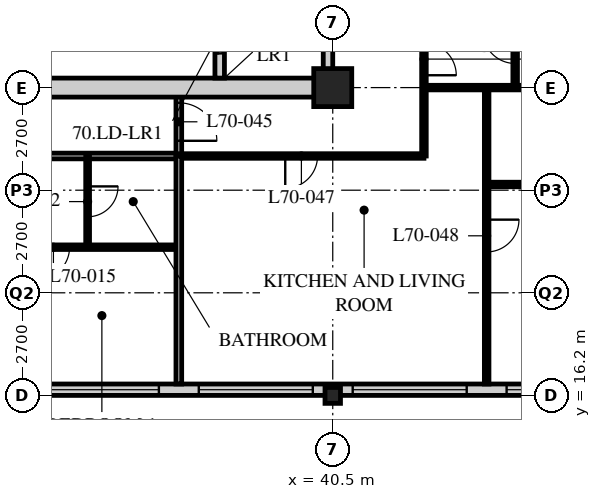
"""IFC4 building model, lengths in metres.
Left out: names, types, materials, properties, quantities, classifications, styles, units other than length and angle.
Written with IfcOpenShell. Run it as: python <this file> out.ifc"""

import sys

from ifc_helpers import new_model, si_unit, direction, frame, frame_2d, origin, origin_2d, place, context, subcontext, project, spatial, rectangle, hollow_rectangle, i_section, extrude, element, fill, save


model = new_model("IFC4")
c1 = context("Model", 3, precision=1e-05, world=origin(), true_north=direction((0.0, 1.0)))
c2 = subcontext(c1, "Body", "Model", "MODEL_VIEW")
j1 = project(units=[si_unit("LENGTHUNIT", "METRE"), si_unit("PLANEANGLEUNIT", "RADIAN")], contexts=[c1])
p1 = place(None, origin())
s1 = spatial("IfcSite", under=j1, at=p1, CompositionType="ELEMENT")
p2 = place(p1, origin())
s2 = spatial("IfcBuilding", under=s1, at=p2, CompositionType="ELEMENT")
p3 = place(p2, frame((0.0, 0.0, 273.6)))
s3 = spatial("IfcBuildingStorey", under=s2, at=p3, CompositionType="ELEMENT", Elevation=273.6)
p4 = place(p3, frame((40.5, 16.2, 0.0), z_axis=(0.0, 0.0, 1.0), x_axis=(1.0, 0.0, 0.0)))
e1 = element("IfcColumn", 1, at=p4, inside=s3, PredefinedType="COLUMN", context=c2, shape_type="SweptSolid", body=[
    extrude(i_section(OverallWidth=0.407, OverallDepth=0.419, WebThickness=0.031, FlangeThickness=0.049, FilletRadius=0.015, at=origin_2d()), origin(), (0.0, 0.0, 1.0), 3.9),
])
p5 = place(p3, frame((40.5, 24.3, 0.0), z_axis=(0.0, 0.0, 1.0), x_axis=(1.0, 0.0, 0.0)))
e2 = element("IfcColumn", 2, at=p5, inside=s3, PredefinedType="COLUMN", context=c2, shape_type="SweptSolid", body=[
    extrude(hollow_rectangle(XDim=1.0, YDim=1.0, WallThickness=0.1, at=origin_2d()), origin(), (0.0, 0.0, 1.0), 3.9),
])
p6 = place(p3, frame((8.4, 16.35, 0.0), z_axis=(0.0, 0.0, 1.0), x_axis=(1.0, 0.0, 0.0)))
e3 = element("IfcWall", 3, at=p6, inside=s3, PredefinedType="SOLIDWALL", context=c2, shape_type="SweptSolid", body=[
    extrude(rectangle(XDim=40.2, YDim=0.3, at=frame_2d((20.1, 0.0))), origin(), (0.0, 0.0, 1.0), 3.69),
])
p7 = place(p6, frame((0.225, 0.0, 0.6)))
e4 = element("IfcOpeningElement", 4, at=p7, cuts=e3, PredefinedType="OPENING", context=c2, shape_type="SweptSolid", body=[
    extrude(rectangle(XDim=3.0, YDim=2.4, at=frame_2d((1.5, 1.2))), frame((0.0, 0.16, 0.0), z_axis=(0.0, -1.0, 0.0), x_axis=(1.0, 0.0, 0.0)), (0.0, 0.0, 1.0), 0.32),
])
p8 = place(p6, frame((4.275, 0.0, 0.6)))
e5 = element("IfcOpeningElement", 5, at=p8, cuts=e3, PredefinedType="OPENING", context=c2, shape_type="SweptSolid", body=[
    extrude(rectangle(XDim=3.0, YDim=2.4, at=frame_2d((1.5, 1.2))), frame((0.0, 0.16, 0.0), z_axis=(0.0, -1.0, 0.0), x_axis=(1.0, 0.0, 0.0)), (0.0, 0.0, 1.0), 0.32),
])
p9 = place(p6, frame((8.325, 0.0, 0.6)))
e6 = element("IfcOpeningElement", 6, at=p9, cuts=e3, PredefinedType="OPENING", context=c2, shape_type="SweptSolid", body=[
    extrude(rectangle(XDim=3.0, YDim=2.4, at=frame_2d((1.5, 1.2))), frame((0.0, 0.16, 0.0), z_axis=(0.0, -1.0, 0.0), x_axis=(1.0, 0.0, 0.0)), (0.0, 0.0, 1.0), 0.32),
])
p10 = place(p6, frame((12.375, 0.0, 0.6)))
e7 = element("IfcOpeningElement", 7, at=p10, cuts=e3, PredefinedType="OPENING", context=c2, shape_type="SweptSolid", body=[
    extrude(rectangle(XDim=3.0, YDim=2.4, at=frame_2d((1.5, 1.2))), frame((0.0, 0.16, 0.0), z_axis=(0.0, -1.0, 0.0), x_axis=(1.0, 0.0, 0.0)), (0.0, 0.0, 1.0), 0.32),
])
p11 = place(p6, frame((16.425, 0.0, 0.6)))
e8 = element("IfcOpeningElement", 8, at=p11, cuts=e3, PredefinedType="OPENING", context=c2, shape_type="SweptSolid", body=[
    extrude(rectangle(XDim=3.0, YDim=2.4, at=frame_2d((1.5, 1.2))), frame((0.0, 0.16, 0.0), z_axis=(0.0, -1.0, 0.0), x_axis=(1.0, 0.0, 0.0)), (0.0, 0.0, 1.0), 0.32),
])
p12 = place(p6, frame((20.475, 0.0, 0.6)))
e9 = element("IfcOpeningElement", 9, at=p12, cuts=e3, PredefinedType="OPENING", context=c2, shape_type="SweptSolid", body=[
    extrude(rectangle(XDim=3.0, YDim=2.4, at=frame_2d((1.5, 1.2))), frame((0.0, 0.16, 0.0), z_axis=(0.0, -1.0, 0.0), x_axis=(1.0, 0.0, 0.0)), (0.0, 0.0, 1.0), 0.32),
])
p13 = place(p6, frame((24.525, 0.0, 0.6)))
e10 = element("IfcOpeningElement", 10, at=p13, cuts=e3, PredefinedType="OPENING", context=c2, shape_type="SweptSolid", body=[
    extrude(rectangle(XDim=3.0, YDim=2.4, at=frame_2d((1.5, 1.2))), frame((0.0, 0.16, 0.0), z_axis=(0.0, -1.0, 0.0), x_axis=(1.0, 0.0, 0.0)), (0.0, 0.0, 1.0), 0.32),
])
p14 = place(p6, frame((28.575, 0.0, 0.6)))
e11 = element("IfcOpeningElement", 11, at=p14, cuts=e3, PredefinedType="OPENING", context=c2, shape_type="SweptSolid", body=[
    extrude(rectangle(XDim=3.0, YDim=2.4, at=frame_2d((1.5, 1.2))), frame((0.0, 0.16, 0.0), z_axis=(0.0, -1.0, 0.0), x_axis=(1.0, 0.0, 0.0)), (0.0, 0.0, 1.0), 0.32),
])
p15 = place(p6, frame((32.625, 0.0, 0.6)))
e12 = element("IfcOpeningElement", 12, at=p15, cuts=e3, PredefinedType="OPENING", context=c2, shape_type="SweptSolid", body=[
    extrude(rectangle(XDim=3.0, YDim=2.4, at=frame_2d((1.5, 1.2))), frame((0.0, 0.16, 0.0), z_axis=(0.0, -1.0, 0.0), x_axis=(1.0, 0.0, 0.0)), (0.0, 0.0, 1.0), 0.32),
])
p16 = place(p6, frame((36.675, 0.0, 0.6)))
e13 = element("IfcOpeningElement", 13, at=p16, cuts=e3, PredefinedType="OPENING", context=c2, shape_type="SweptSolid", body=[
    extrude(rectangle(XDim=3.0, YDim=2.4, at=frame_2d((1.5, 1.2))), frame((0.0, 0.16, 0.0), z_axis=(0.0, -1.0, 0.0), x_axis=(1.0, 0.0, 0.0)), (0.0, 0.0, 1.0), 0.32),
])
p17 = place(p3, frame((12.15, 22.5, 0.0), z_axis=(0.0, 0.0, 1.0), x_axis=(1.0, 0.0, 0.0)))
e14 = element("IfcWall", 14, at=p17, inside=s3, PredefinedType="PARTITIONING", context=c2, shape_type="SweptSolid", body=[
    extrude(rectangle(XDim=24.3, YDim=0.15, at=frame_2d((12.15, 0.0))), origin(), (0.0, 0.0, 1.0), 3.69),
])
p18 = place(p17, frame((4.45, 0.0, 0.0)))
e15 = element("IfcOpeningElement", 15, at=p18, cuts=e14, PredefinedType="OPENING", context=c2, shape_type="SweptSolid", body=[
    extrude(rectangle(XDim=1.0, YDim=2.1, at=frame_2d((0.5, 1.05))), frame((0.0, 0.085, 0.0), z_axis=(0.0, -1.0, 0.0), x_axis=(1.0, 0.0, 0.0)), (0.0, 0.0, 1.0), 0.17),
])
p19 = place(p17, frame((12.55, 0.0, 0.0)))
e16 = element("IfcOpeningElement", 16, at=p19, cuts=e14, PredefinedType="OPENING", context=c2, shape_type="SweptSolid", body=[
    extrude(rectangle(XDim=1.0, YDim=2.1, at=frame_2d((0.5, 1.05))), frame((0.0, 0.085, 0.0), z_axis=(0.0, -1.0, 0.0), x_axis=(1.0, 0.0, 0.0)), (0.0, 0.0, 1.0), 0.17),
])
p20 = place(p17, frame((2.625, 0.0, 0.0)))
e17 = element("IfcOpeningElement", 17, at=p20, cuts=e14, PredefinedType="OPENING", context=c2, shape_type="SweptSolid", body=[
    extrude(rectangle(XDim=1.0, YDim=2.1, at=frame_2d((0.5, 1.05))), frame((0.0, 0.085, 0.0), z_axis=(0.0, -1.0, 0.0), x_axis=(1.0, 0.0, 0.0)), (0.0, 0.0, 1.0), 0.17),
])
p21 = place(p3, frame((36.45, 22.5, 0.0), z_axis=(0.0, 0.0, 1.0), x_axis=(0.0, 1.0, 0.0)))
e18 = element("IfcWall", 18, at=p21, inside=s3, PredefinedType="PARTITIONING", context=c2, shape_type="SweptSolid", body=[
    extrude(rectangle(XDim=1.8, YDim=0.15, at=frame_2d((0.9, 0.0))), origin(), (0.0, 0.0, 1.0), 3.69),
])
p22 = place(p21, frame((0.4, 0.0, 0.0)))
e19 = element("IfcOpeningElement", 19, at=p22, cuts=e18, PredefinedType="OPENING", context=c2, shape_type="SweptSolid", body=[
    extrude(rectangle(XDim=1.0, YDim=2.1, at=frame_2d((0.5, 1.05))), frame((0.0, 0.085, 0.0), z_axis=(0.0, -1.0, 0.0), x_axis=(1.0, 0.0, 0.0)), (0.0, 0.0, 1.0), 0.17),
])
p23 = place(p3, frame((34.05, 22.5, 0.0), z_axis=(0.0, 0.0, 1.0), x_axis=(0.0, -1.0, 0.0)))
e20 = element("IfcWall", 20, at=p23, inside=s3, PredefinedType="PARTITIONING", context=c2, shape_type="SweptSolid", body=[
    extrude(rectangle(XDim=2.4, YDim=0.1, at=frame_2d((1.2, 0.0))), origin(), (0.0, 0.0, 1.0), 3.69),
])
p24 = place(p23, frame((0.8, 0.0, 0.0)))
e21 = element("IfcOpeningElement", 21, at=p24, cuts=e20, PredefinedType="OPENING", context=c2, shape_type="SweptSolid", body=[
    extrude(rectangle(XDim=0.8, YDim=2.1, at=frame_2d((0.4, 1.05))), frame((0.0, 0.06, 0.0), z_axis=(0.0, -1.0, 0.0), x_axis=(1.0, 0.0, 0.0)), (0.0, 0.0, 1.0), 0.12),
])
p25 = place(p3, frame((12.15, 20.1, 0.0), z_axis=(0.0, 0.0, 1.0), x_axis=(1.0, 0.0, 0.0)))
e22 = element("IfcWall", 22, at=p25, inside=s3, PredefinedType="PARTITIONING", context=c2, shape_type="SweptSolid", body=[
    extrude(rectangle(XDim=24.3, YDim=0.12, at=frame_2d((12.15, 0.0))), origin(), (0.0, 0.0, 1.0), 3.69),
])
p26 = place(p25, frame((5.025, 0.0, 0.0)))
e23 = element("IfcOpeningElement", 23, at=p26, cuts=e22, PredefinedType="OPENING", context=c2, shape_type="SweptSolid", body=[
    extrude(rectangle(XDim=0.85, YDim=2.1, at=frame_2d((0.425, 1.05))), frame((0.0, 0.07, 0.0), z_axis=(0.0, -1.0, 0.0), x_axis=(1.0, 0.0, 0.0)), (0.0, 0.0, 1.0), 0.14),
])
p27 = place(p25, frame((8.425, 0.0, 0.0)))
e24 = element("IfcOpeningElement", 24, at=p27, cuts=e22, PredefinedType="OPENING", context=c2, shape_type="SweptSolid", body=[
    extrude(rectangle(XDim=0.85, YDim=2.1, at=frame_2d((0.425, 1.05))), frame((0.0, 0.07, 0.0), z_axis=(0.0, -1.0, 0.0), x_axis=(1.0, 0.0, 0.0)), (0.0, 0.0, 1.0), 0.14),
])
p28 = place(p25, frame((13.125, 0.0, 0.0)))
e25 = element("IfcOpeningElement", 25, at=p28, cuts=e22, PredefinedType="OPENING", context=c2, shape_type="SweptSolid", body=[
    extrude(rectangle(XDim=0.85, YDim=2.1, at=frame_2d((0.425, 1.05))), frame((0.0, 0.07, 0.0), z_axis=(0.0, -1.0, 0.0), x_axis=(1.0, 0.0, 0.0)), (0.0, 0.0, 1.0), 0.14),
])
p29 = place(p25, frame((20.575, 0.0, 0.0)))
e26 = element("IfcOpeningElement", 26, at=p29, cuts=e22, PredefinedType="OPENING", context=c2, shape_type="SweptSolid", body=[
    extrude(rectangle(XDim=0.85, YDim=2.1, at=frame_2d((0.425, 1.05))), frame((0.0, 0.07, 0.0), z_axis=(0.0, -1.0, 0.0), x_axis=(1.0, 0.0, 0.0)), (0.0, 0.0, 1.0), 0.14),
])
p30 = place(p25, frame((2.725, 0.0, 0.0)))
e27 = element("IfcOpeningElement", 27, at=p30, cuts=e22, PredefinedType="OPENING", context=c2, shape_type="SweptSolid", body=[
    extrude(rectangle(XDim=0.85, YDim=2.1, at=frame_2d((0.425, 1.05))), frame((0.0, 0.07, 0.0), z_axis=(0.0, -1.0, 0.0), x_axis=(1.0, 0.0, 0.0)), (0.0, 0.0, 1.0), 0.14),
])
p31 = place(p3, frame((42.9, 22.5, 0.0), z_axis=(0.0, 0.0, 1.0), x_axis=(0.0, 1.0, 0.0)))
e28 = element("IfcWall", 28, at=p31, inside=s3, PredefinedType="PARTITIONING", context=c2, shape_type="SweptSolid", body=[
    extrude(rectangle(XDim=18.0, YDim=0.12, at=frame_2d((9.0, 0.0))), origin(), (0.0, 0.0, 1.0), 3.69),
])
p32 = place(p31, frame((2.125, 0.0, 0.0)))
e29 = element("IfcOpeningElement", 29, at=p32, cuts=e28, PredefinedType="OPENING", context=c2, shape_type="SweptSolid", body=[
    extrude(rectangle(XDim=0.85, YDim=2.1, at=frame_2d((0.425, 1.05))), frame((0.0, 0.07, 0.0), z_axis=(0.0, -1.0, 0.0), x_axis=(1.0, 0.0, 0.0)), (0.0, 0.0, 1.0), 0.14),
])
p33 = place(p31, frame((6.175, 0.0, 0.0)))
e30 = element("IfcOpeningElement", 30, at=p33, cuts=e28, PredefinedType="OPENING", context=c2, shape_type="SweptSolid", body=[
    extrude(rectangle(XDim=0.85, YDim=2.1, at=frame_2d((0.425, 1.05))), frame((0.0, 0.07, 0.0), z_axis=(0.0, -1.0, 0.0), x_axis=(1.0, 0.0, 0.0)), (0.0, 0.0, 1.0), 0.14),
])
p34 = place(p31, frame((10.225, 0.0, 0.0)))
e31 = element("IfcOpeningElement", 31, at=p34, cuts=e28, PredefinedType="OPENING", context=c2, shape_type="SweptSolid", body=[
    extrude(rectangle(XDim=0.85, YDim=2.1, at=frame_2d((0.425, 1.05))), frame((0.0, 0.07, 0.0), z_axis=(0.0, -1.0, 0.0), x_axis=(1.0, 0.0, 0.0)), (0.0, 0.0, 1.0), 0.14),
])
p35 = place(p31, frame((14.275, 0.0, 0.0)))
e32 = element("IfcOpeningElement", 32, at=p35, cuts=e28, PredefinedType="OPENING", context=c2, shape_type="SweptSolid", body=[
    extrude(rectangle(XDim=0.85, YDim=2.1, at=frame_2d((0.425, 1.05))), frame((0.0, 0.07, 0.0), z_axis=(0.0, -1.0, 0.0), x_axis=(1.0, 0.0, 0.0)), (0.0, 0.0, 1.0), 0.14),
])
p36 = place(p3, frame((36.45, 22.5, 0.0), z_axis=(0.0, 0.0, 1.0), x_axis=(1.0, 0.0, 0.0)))
e33 = element("IfcWall", 33, at=p36, inside=s3, PredefinedType="PARTITIONING", context=c2, shape_type="SweptSolid", body=[
    extrude(rectangle(XDim=6.45, YDim=0.12, at=frame_2d((3.225, 0.0))), origin(), (0.0, 0.0, 1.0), 3.69),
])
p37 = place(p36, frame((2.8, 0.0, 0.0)))
e34 = element("IfcOpeningElement", 34, at=p37, cuts=e33, PredefinedType="OPENING", context=c2, shape_type="SweptSolid", body=[
    extrude(rectangle(XDim=0.85, YDim=2.1, at=frame_2d((0.425, 1.05))), frame((0.0, 0.07, 0.0), z_axis=(0.0, -1.0, 0.0), x_axis=(1.0, 0.0, 0.0)), (0.0, 0.0, 1.0), 0.14),
])
p38 = place(p3, frame((42.9, 24.3, 0.0), z_axis=(0.0, 0.0, 1.0), x_axis=(1.0, 0.0, 0.0)))
e35 = element("IfcWall", 35, at=p38, inside=s3, PredefinedType="PARTITIONING", context=c2, shape_type="SweptSolid", body=[
    extrude(rectangle(XDim=9.45, YDim=0.12, at=frame_2d((4.725, 0.0))), origin(), (0.0, 0.0, 1.0), 3.078),
])
p39 = place(p3, frame((36.45, 16.5, 0.0), z_axis=(0.0, 0.0, 1.0), x_axis=(0.0, 1.0, 0.0)))
e36 = element("IfcWall", 36, at=p39, inside=s3, PredefinedType="PARTITIONING", context=c2, shape_type="SweptSolid", body=[
    extrude(rectangle(XDim=6.0, YDim=0.15, at=frame_2d((3.0, 0.0))), origin(), (0.0, 0.0, 1.0), 3.69),
])
p40 = place(p3, frame((44.55, 16.5, 0.0), z_axis=(0.0, 0.0, 1.0), x_axis=(0.0, 1.0, 0.0)))
e37 = element("IfcWall", 37, at=p40, inside=s3, PredefinedType="PARTITIONING", context=c2, shape_type="SweptSolid", body=[
    extrude(rectangle(XDim=7.8, YDim=0.12, at=frame_2d((3.9, 0.0))), origin(), (0.0, 0.0, 1.0), 3.69),
])
p41 = place(p40, frame((3.475, 0.0, 0.0)))
e38 = element("IfcOpeningElement", 38, at=p41, cuts=e37, PredefinedType="OPENING", context=c2, shape_type="SweptSolid", body=[
    extrude(rectangle(XDim=0.85, YDim=2.1, at=frame_2d((0.425, 1.05))), frame((0.0, 0.07, 0.0), z_axis=(0.0, -1.0, 0.0), x_axis=(1.0, 0.0, 0.0)), (0.0, 0.0, 1.0), 0.14),
])
p42 = place(p3, frame((45.3, 24.3, 0.0), z_axis=(0.0, 0.0, 1.0), x_axis=(0.0, 1.0, 0.0)))
e39 = element("IfcWall", 39, at=p42, inside=s3, PredefinedType="PARTITIONING", context=c2, shape_type="SweptSolid", body=[
    extrude(rectangle(XDim=1.76, YDim=0.12, at=frame_2d((0.88, 0.0))), origin(), (0.0, 0.0, 1.0), 3.69),
])
p43 = place(p42, frame((0.635, 0.0, 0.0)))
e40 = element("IfcOpeningElement", 40, at=p43, cuts=e39, PredefinedType="OPENING", context=c2, shape_type="SweptSolid", body=[
    extrude(rectangle(XDim=0.85, YDim=2.1, at=frame_2d((0.425, 1.05))), frame((0.0, 0.07, 0.0), z_axis=(0.0, -1.0, 0.0), x_axis=(1.0, 0.0, 0.0)), (0.0, 0.0, 1.0), 0.14),
])
p44 = place(p3, frame((44.55, 21.75, 0.0), z_axis=(0.0, 0.0, 1.0), x_axis=(1.0, 0.0, 0.0)))
e41 = element("IfcWall", 41, at=p44, inside=s3, PredefinedType="PARTITIONING", context=c2, shape_type="SweptSolid", body=[
    extrude(rectangle(XDim=7.8, YDim=0.12, at=frame_2d((3.9, 0.0))), origin(), (0.0, 0.0, 1.0), 3.69),
])
p45 = place(p44, frame((3.475, 0.0, 0.0)))
e42 = element("IfcOpeningElement", 42, at=p45, cuts=e41, PredefinedType="OPENING", context=c2, shape_type="SweptSolid", body=[
    extrude(rectangle(XDim=0.85, YDim=2.1, at=frame_2d((0.425, 1.05))), frame((0.0, 0.07, 0.0), z_axis=(0.0, -1.0, 0.0), x_axis=(1.0, 0.0, 0.0)), (0.0, 0.0, 1.0), 0.14),
])
p46 = place(p3, frame((15.95, 24.3, 0.0), z_axis=(0.0, 0.0, 1.0), x_axis=(1.0, 0.0, 0.0)))
e43 = element("IfcWall", 43, at=p46, inside=s3, PredefinedType="SOLIDWALL", context=c2, shape_type="SweptSolid", body=[
    extrude(rectangle(XDim=24.55, YDim=0.5, at=frame_2d((12.275, 0.0))), origin(), (0.0, 0.0, 1.0), 3.04),
])
p47 = place(p46, frame((11.5, 0.0, 0.0)))
e44 = element("IfcOpeningElement", 44, at=p47, cuts=e43, PredefinedType="OPENING", context=c2, shape_type="SweptSolid", body=[
    extrude(rectangle(XDim=1.8, YDim=2.4, at=frame_2d((0.9, 1.2))), frame((0.0, 0.26, 0.0), z_axis=(0.0, -1.0, 0.0), x_axis=(1.0, 0.0, 0.0)), (0.0, 0.0, 1.0), 0.52),
])
p48 = place(p3, frame((40.375, 24.55, 0.0), z_axis=(0.0, 0.0, 1.0), x_axis=(0.0, 1.0, 0.0)))
e45 = element("IfcWall", 45, at=p48, inside=s3, PredefinedType="SOLIDWALL", context=c2, shape_type="SweptSolid", body=[
    extrude(rectangle(XDim=15.7, YDim=0.25, at=frame_2d((7.85, 0.0))), origin(), (0.0, 0.0, 1.0), 3.078),
])
p49 = place(p3, frame((37.525, 24.55, 0.0), z_axis=(0.0, 0.0, 1.0), x_axis=(0.0, 1.0, 0.0)))
e46 = element("IfcWall", 46, at=p49, inside=s3, PredefinedType="SOLIDWALL", context=c2, shape_type="SweptSolid", body=[
    extrude(rectangle(XDim=7.75, YDim=0.25, at=frame_2d((3.875, 0.0))), origin(), (0.0, 0.0, 1.0), 3.69),
])
p50 = place(p49, frame((0.65, 0.0, 0.0)))
e47 = element("IfcOpeningElement", 47, at=p50, cuts=e46, PredefinedType="OPENING", context=c2, shape_type="SweptSolid", body=[
    extrude(rectangle(XDim=1.1, YDim=2.4, at=frame_2d((0.55, 1.2))), frame((0.0, 0.135, 0.0), z_axis=(0.0, -1.0, 0.0), x_axis=(1.0, 0.0, 0.0)), (0.0, 0.0, 1.0), 0.27),
])
p51 = place(p49, frame((3.25, 0.0, 0.0)))
e48 = element("IfcOpeningElement", 48, at=p51, cuts=e46, PredefinedType="OPENING", context=c2, shape_type="SweptSolid", body=[
    extrude(rectangle(XDim=1.1, YDim=2.4, at=frame_2d((0.55, 1.2))), frame((0.0, 0.135, 0.0), z_axis=(0.0, -1.0, 0.0), x_axis=(1.0, 0.0, 0.0)), (0.0, 0.0, 1.0), 0.27),
])
p52 = place(p49, frame((5.85, 0.0, 0.0)))
e49 = element("IfcOpeningElement", 49, at=p52, cuts=e46, PredefinedType="OPENING", context=c2, shape_type="SweptSolid", body=[
    extrude(rectangle(XDim=1.1, YDim=2.4, at=frame_2d((0.55, 1.2))), frame((0.0, 0.135, 0.0), z_axis=(0.0, -1.0, 0.0), x_axis=(1.0, 0.0, 0.0)), (0.0, 0.0, 1.0), 0.27),
])
p53 = place(p13, origin())
e50 = element("IfcWindow", 50, at=p53, inside=s3, PartitioningType="SINGLE_PANEL", PredefinedType="WINDOW", context=c2, shape_type="SweptSolid", body=[
    extrude(rectangle(XDim=3.0, YDim=2.4, at=frame_2d((1.5, 1.2))), frame((0.0, 0.03, 0.0), z_axis=(0.0, -1.0, 0.0), x_axis=(1.0, 0.0, 0.0)), (0.0, 0.0, 1.0), 0.06),
])
fill(e10, e50)
p54 = place(p14, origin())
e51 = element("IfcWindow", 51, at=p54, inside=s3, PartitioningType="SINGLE_PANEL", PredefinedType="WINDOW", context=c2, shape_type="SweptSolid", body=[
    extrude(rectangle(XDim=3.0, YDim=2.4, at=frame_2d((1.5, 1.2))), frame((0.0, 0.03, 0.0), z_axis=(0.0, -1.0, 0.0), x_axis=(1.0, 0.0, 0.0)), (0.0, 0.0, 1.0), 0.06),
])
fill(e11, e51)
p55 = place(p15, origin())
e52 = element("IfcWindow", 52, at=p55, inside=s3, PartitioningType="SINGLE_PANEL", PredefinedType="WINDOW", context=c2, shape_type="SweptSolid", body=[
    extrude(rectangle(XDim=3.0, YDim=2.4, at=frame_2d((1.5, 1.2))), frame((0.0, 0.03, 0.0), z_axis=(0.0, -1.0, 0.0), x_axis=(1.0, 0.0, 0.0)), (0.0, 0.0, 1.0), 0.06),
])
fill(e12, e52)
p56 = place(p16, origin())
e53 = element("IfcWindow", 53, at=p56, inside=s3, PartitioningType="SINGLE_PANEL", PredefinedType="WINDOW", context=c2, shape_type="SweptSolid", body=[
    extrude(rectangle(XDim=3.0, YDim=2.4, at=frame_2d((1.5, 1.2))), frame((0.0, 0.03, 0.0), z_axis=(0.0, -1.0, 0.0), x_axis=(1.0, 0.0, 0.0)), (0.0, 0.0, 1.0), 0.06),
])
fill(e13, e53)
p57 = place(p24, origin())
e54 = element("IfcDoor", 54, at=p57, inside=s3, OperationType="SINGLE_SWING_LEFT", PredefinedType="DOOR", context=c2, shape_type="SweptSolid", body=[
    extrude(rectangle(XDim=0.8, YDim=2.1, at=frame_2d((0.4, 1.05))), frame((0.0, 0.025, 0.0), z_axis=(0.0, -1.0, 0.0), x_axis=(1.0, 0.0, 0.0)), (0.0, 0.0, 1.0), 0.05),
])
fill(e21, e54)
p58 = place(p29, origin())
e55 = element("IfcDoor", 55, at=p58, inside=s3, OperationType="SINGLE_SWING_RIGHT", PredefinedType="DOOR", context=c2, shape_type="SweptSolid", body=[
    extrude(rectangle(XDim=0.85, YDim=2.1, at=frame_2d((0.425, 1.05))), frame((0.0, 0.025, 0.0), z_axis=(0.0, -1.0, 0.0), x_axis=(1.0, 0.0, 0.0)), (0.0, 0.0, 1.0), 0.05),
])
fill(e26, e55)
p59 = place(p22, origin())
e56 = element("IfcDoor", 56, at=p59, inside=s3, OperationType="SINGLE_SWING_RIGHT", PredefinedType="DOOR", context=c2, shape_type="SweptSolid", body=[
    extrude(rectangle(XDim=1.0, YDim=2.1, at=frame_2d((0.5, 1.05))), frame((0.0, 0.025, 0.0), z_axis=(0.0, -1.0, 0.0), x_axis=(1.0, 0.0, 0.0)), (0.0, 0.0, 1.0), 0.05),
])
fill(e19, e56)
p60 = place(p37, origin())
e57 = element("IfcDoor", 57, at=p60, inside=s3, OperationType="SINGLE_SWING_RIGHT", PredefinedType="DOOR", context=c2, shape_type="SweptSolid", body=[
    extrude(rectangle(XDim=0.85, YDim=2.1, at=frame_2d((0.425, 1.05))), frame((0.0, 0.025, 0.0), z_axis=(0.0, -1.0, 0.0), x_axis=(1.0, 0.0, 0.0)), (0.0, 0.0, 1.0), 0.05),
])
fill(e34, e57)
p61 = place(p41, origin())
e58 = element("IfcDoor", 58, at=p61, inside=s3, OperationType="SINGLE_SWING_LEFT", PredefinedType="DOOR", context=c2, shape_type="SweptSolid", body=[
    extrude(rectangle(XDim=0.85, YDim=2.1, at=frame_2d((0.425, 1.05))), frame((0.0, 0.025, 0.0), z_axis=(0.0, -1.0, 0.0), x_axis=(1.0, 0.0, 0.0)), (0.0, 0.0, 1.0), 0.05),
])
fill(e38, e58)
p62 = place(p32, origin())
e59 = element("IfcDoor", 59, at=p62, inside=s3, OperationType="SINGLE_SWING_RIGHT", PredefinedType="DOOR", context=c2, shape_type="SweptSolid", body=[
    extrude(rectangle(XDim=0.85, YDim=2.1, at=frame_2d((0.425, 1.05))), frame((0.0, 0.025, 0.0), z_axis=(0.0, -1.0, 0.0), x_axis=(1.0, 0.0, 0.0)), (0.0, 0.0, 1.0), 0.05),
])
fill(e29, e59)
p63 = place(p43, origin())
e60 = element("IfcDoor", 60, at=p63, inside=s3, OperationType="SINGLE_SWING_RIGHT", PredefinedType="DOOR", context=c2, shape_type="SweptSolid", body=[
    extrude(rectangle(XDim=0.85, YDim=2.1, at=frame_2d((0.425, 1.05))), frame((0.0, 0.025, 0.0), z_axis=(0.0, -1.0, 0.0), x_axis=(1.0, 0.0, 0.0)), (0.0, 0.0, 1.0), 0.05),
])
fill(e40, e60)
p64 = place(p50, origin())
e61 = element("IfcDoor", 61, at=p64, inside=s3, OperationType="DOUBLE_DOOR_SLIDING", PredefinedType="DOOR", context=c2, shape_type="SweptSolid", body=[
    extrude(rectangle(XDim=1.1, YDim=2.4, at=frame_2d((0.55, 1.2))), frame((0.0, 0.025, 0.0), z_axis=(0.0, -1.0, 0.0), x_axis=(1.0, 0.0, 0.0)), (0.0, 0.0, 1.0), 0.05),
])
fill(e47, e61)
save(model, sys.argv[1])
